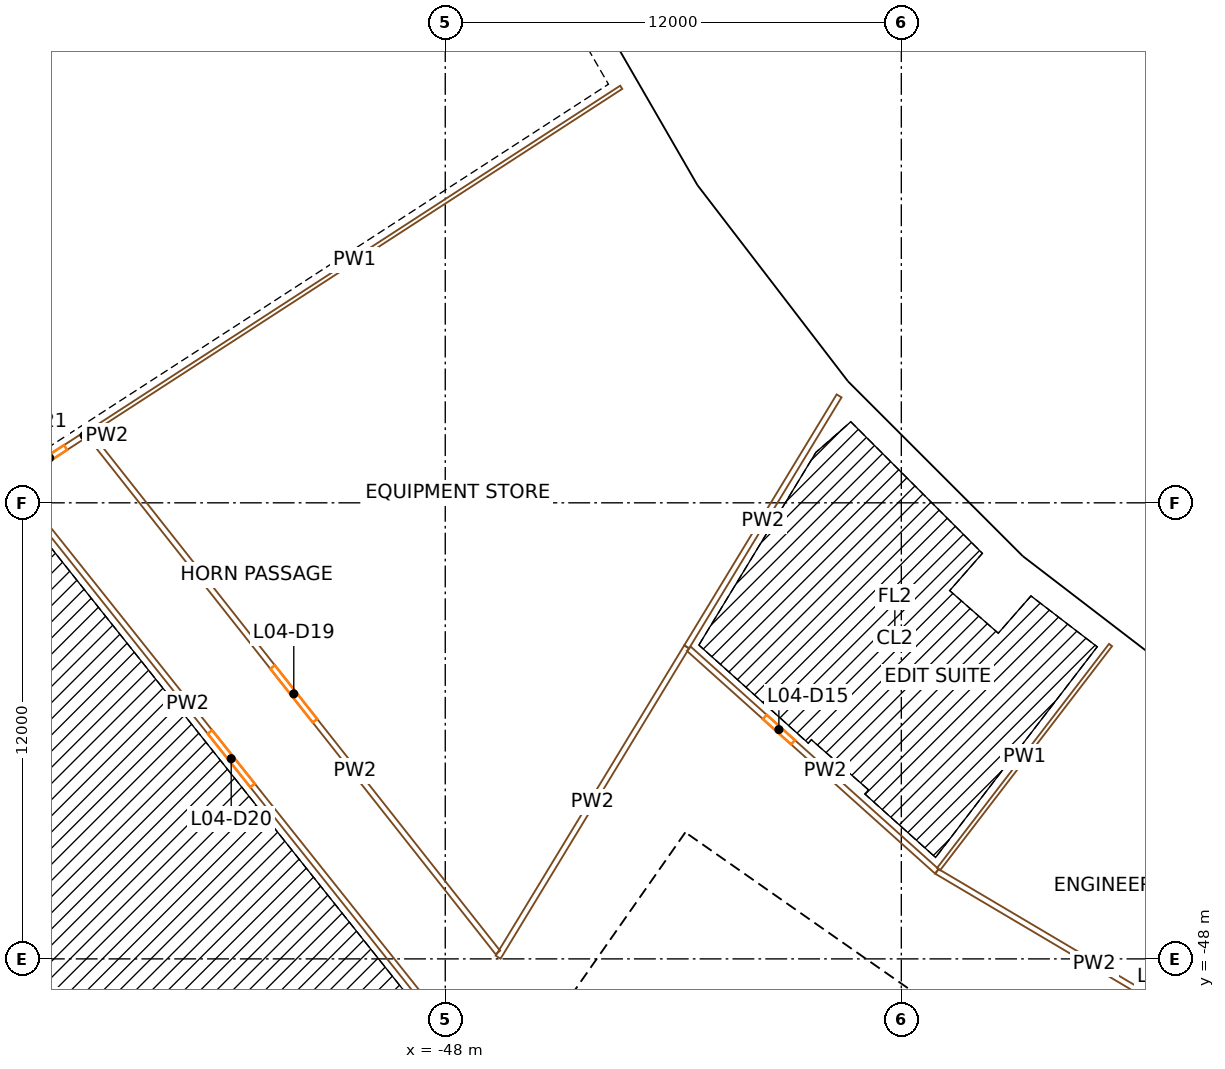
"""IFC4 building model, lengths in metres.
Left out: names, types, materials, properties, quantities, classifications, styles, units other than length and angle.
Written with IfcOpenShell. Run it as: python <this file> out.ifc"""

import sys

from ifc_helpers import new_model, si_unit, direction, frame, frame_2d, origin, origin_2d, place, context, subcontext, project, spatial, rectangle, extrude, element, fill, save


model = new_model("IFC4")
c1 = context("Model", 3, precision=1e-05, world=origin(), true_north=direction((0.0, 1.0)))
c2 = subcontext(c1, "Body", "Model", "MODEL_VIEW")
j1 = project(units=[si_unit("LENGTHUNIT", "METRE"), si_unit("PLANEANGLEUNIT", "RADIAN")], contexts=[c1])
p1 = place(None, origin())
s1 = spatial("IfcSite", under=j1, at=p1, CompositionType="ELEMENT")
p2 = place(p1, origin())
s2 = spatial("IfcBuilding", under=s1, at=p2, CompositionType="ELEMENT")
p3 = place(p2, frame((0.0, 0.0, 31.5)))
s3 = spatial("IfcBuildingStorey", under=s2, at=p3, CompositionType="ELEMENT", Elevation=31.5)
p4 = place(p3, frame((-52.243, -25.763, 0.0), z_axis=(0.0, 0.0, 1.0), x_axis=(0.442288690219, -0.896872741533, 0.0)))
e1 = element("IfcColumn", 1, at=p4, inside=s3, PredefinedType="COLUMN", context=c2, shape_type="SweptSolid", body=[
    extrude(rectangle(XDim=1.4, YDim=1.8, at=origin_2d()), origin(), (0.0, 0.0, 1.0), 4.5),
])
p5 = place(p3, frame((-42.197, -28.195, 0.0), z_axis=(0.0, 0.0, 1.0), x_axis=(0.55557023302, -0.831469612303, 0.0)))
e2 = element("IfcColumn", 2, at=p5, inside=s3, PredefinedType="COLUMN", context=c2, shape_type="SweptSolid", body=[
    extrude(rectangle(XDim=1.1, YDim=1.3, at=origin_2d()), origin(), (0.0, 0.0, 1.0), 4.5),
])
p6 = place(p3, frame((-48.433, -32.362, 0.0), z_axis=(0.0, 0.0, 1.0), x_axis=(0.55557023302, -0.831469612303, 0.0)))
e3 = element("IfcColumn", 3, at=p6, inside=s3, PredefinedType="COLUMN", context=c2, shape_type="SweptSolid", body=[
    extrude(rectangle(XDim=1.4, YDim=1.8, at=origin_2d()), origin(), (0.0, 0.0, 1.0), 4.5),
])
p7 = place(p3, frame((-38.156, -33.462, 0.0), z_axis=(0.0, 0.0, 1.0), x_axis=(0.6593458151, -0.751839807479, 0.0)))
e4 = element("IfcColumn", 4, at=p7, inside=s3, PredefinedType="COLUMN", context=c2, shape_type="SweptSolid", body=[
    extrude(rectangle(XDim=1.1, YDim=1.3, at=origin_2d()), origin(), (0.0, 0.0, 1.0), 4.5),
])
p8 = place(p3, frame((-43.795, -38.407, 0.0), z_axis=(0.0, 0.0, 1.0), x_axis=(0.6593458151, -0.751839807479, 0.0)))
e5 = element("IfcColumn", 5, at=p8, inside=s3, PredefinedType="COLUMN", context=c2, shape_type="SweptSolid", body=[
    extrude(rectangle(XDim=1.4, YDim=1.8, at=origin_2d()), origin(), (0.0, 0.0, 1.0), 4.5),
])
p9 = place(p3, frame((-33.462, -38.156, 0.0), z_axis=(0.0, 0.0, 1.0), x_axis=(0.751839807479, -0.6593458151, 0.0)))
e6 = element("IfcColumn", 6, at=p9, inside=s3, PredefinedType="COLUMN", context=c2, shape_type="SweptSolid", body=[
    extrude(rectangle(XDim=1.1, YDim=1.3, at=origin_2d()), origin(), (0.0, 0.0, 1.0), 4.5),
])
for number, where, z_axis, x_axis in (
    (7, (-38.407, -43.795, 0.0), (0.0, 0.0, 1.0), (0.752, -0.659, 0.0)),
    (8, (-32.362, -48.433, 0.0), (0.0, 0.0, 1.0), (0.831, -0.556, 0.0)),
):
    element("IfcColumn", number, at=place(p3, frame(where, z_axis=z_axis, x_axis=x_axis)), inside=s3, PredefinedType="COLUMN", context=c2, shape_type="SweptSolid", body=[
        extrude(rectangle(XDim=1.4, YDim=1.8, at=origin_2d()), origin(), (0.0, 0.0, 1.0), 4.5),
    ])
p10 = place(p3, frame((-49.779, -57.191, 0.0), z_axis=(0.0, 0.0, 1.0), x_axis=(0.573577477574, 0.819151315216, 0.0)))
e9 = element("IfcWall", 9, at=p10, inside=s3, PredefinedType="SHEAR", context=c2, shape_type="SweptSolid", body=[
    extrude(rectangle(XDim=14.8, YDim=0.9, at=frame_2d((7.4, 0.0))), origin(), (0.0, 0.0, 1.0), 4.1),
])
p11 = place(p10, frame((6.7, 0.0, 0.0)))
e10 = element("IfcOpeningElement", 10, at=p11, cuts=e9, PredefinedType="OPENING", context=c2, shape_type="SweptSolid", body=[
    extrude(rectangle(XDim=1.4, YDim=2.1, at=frame_2d((0.7, 1.05))), frame((0.0, 0.46, 0.0), z_axis=(0.0, -1.0, 0.0), x_axis=(1.0, 0.0, 0.0)), (0.0, 0.0, 1.0), 0.92),
])
p12 = place(p3, frame((-28.854, -54.324, 0.0), z_axis=(0.0, 0.0, 1.0), x_axis=(-0.819145767589, 0.573585400304, 0.0)))
e11 = element("IfcWall", 11, at=p12, inside=s3, PredefinedType="SHEAR", context=c2, shape_type="SweptSolid", body=[
    extrude(rectangle(XDim=15.045, YDim=0.9, at=frame_2d((7.523, 0.0))), origin(), (0.0, 0.0, 1.0), 4.1),
])
p13 = place(p12, frame((1.05, 0.0, 0.0)))
e12 = element("IfcOpeningElement", 12, at=p13, cuts=e11, PredefinedType="OPENING", context=c2, shape_type="SweptSolid", body=[
    extrude(rectangle(XDim=0.9, YDim=2.1, at=frame_2d((0.45, 1.05))), frame((0.0, 0.46, 0.0), z_axis=(0.0, -1.0, 0.0), x_axis=(1.0, 0.0, 0.0)), (0.0, 0.0, 1.0), 0.92),
])
p14 = place(p12, frame((3.775, 0.0, 0.0)))
e13 = element("IfcOpeningElement", 13, at=p14, cuts=e11, PredefinedType="OPENING", context=c2, shape_type="SweptSolid", body=[
    extrude(rectangle(XDim=1.0, YDim=2.1, at=frame_2d((0.5, 1.05))), frame((0.0, 0.46, 0.0), z_axis=(0.0, -1.0, 0.0), x_axis=(1.0, 0.0, 0.0)), (0.0, 0.0, 1.0), 0.92),
])
p15 = place(p12, frame((6.275, 0.0, 0.0)))
e14 = element("IfcOpeningElement", 14, at=p15, cuts=e11, PredefinedType="OPENING", context=c2, shape_type="SweptSolid", body=[
    extrude(rectangle(XDim=1.0, YDim=2.1, at=frame_2d((0.5, 1.05))), frame((0.0, 0.46, 0.0), z_axis=(0.0, -1.0, 0.0), x_axis=(1.0, 0.0, 0.0)), (0.0, 0.0, 1.0), 0.92),
])
p16 = place(p12, frame((13.495, 0.0, 0.0)))
e15 = element("IfcOpeningElement", 15, at=p16, cuts=e11, PredefinedType="OPENING", context=c2, shape_type="SweptSolid", body=[
    extrude(rectangle(XDim=1.1, YDim=2.1, at=frame_2d((0.55, 1.05))), frame((0.0, 0.46, 0.0), z_axis=(0.0, -1.0, 0.0), x_axis=(1.0, 0.0, 0.0)), (0.0, 0.0, 1.0), 0.92),
])
p17 = place(p3, frame((-41.583, -27.714, 0.0), z_axis=(0.0, 0.0, 1.0), x_axis=(-0.50000447882, 0.866022817921, 0.0)))
e16 = element("IfcWall", 16, at=p17, inside=s3, PredefinedType="SOLIDWALL", context=c2, shape_type="SweptSolid", body=[
    extrude(rectangle(XDim=6.419, YDim=0.45, at=frame_2d((3.21, 0.0))), origin(), (0.0, 0.0, 1.0), 3.2),
])
p18 = place(p17, frame((3.66, 0.0, 0.9)))
e17 = element("IfcOpeningElement", 17, at=p18, cuts=e16, PredefinedType="OPENING", context=c2, shape_type="SweptSolid", body=[
    extrude(rectangle(XDim=1.2, YDim=2.15, at=frame_2d((0.6, 1.075))), frame((0.0, 0.235, 0.0), z_axis=(0.0, -1.0, 0.0), x_axis=(1.0, 0.0, 0.0)), (0.0, 0.0, 1.0), 0.47),
])
p19 = place(p17, frame((1.56, 0.0, 0.9)))
e18 = element("IfcOpeningElement", 18, at=p19, cuts=e16, PredefinedType="OPENING", context=c2, shape_type="SweptSolid", body=[
    extrude(rectangle(XDim=1.2, YDim=2.15, at=frame_2d((0.6, 1.075))), frame((0.0, 0.235, 0.0), z_axis=(0.0, -1.0, 0.0), x_axis=(1.0, 0.0, 0.0)), (0.0, 0.0, 1.0), 0.47),
])
p20 = place(p3, frame((-37.555, -32.975, 0.0), z_axis=(0.0, 0.0, 1.0), x_axis=(-0.608780327927, 0.793338838284, 0.0)))
e19 = element("IfcWall", 19, at=p20, inside=s3, PredefinedType="SOLIDWALL", context=c2, shape_type="SweptSolid", body=[
    extrude(rectangle(XDim=6.597, YDim=0.45, at=frame_2d((3.298, 0.0))), origin(), (0.0, 0.0, 1.0), 3.2),
])
p21 = place(p20, frame((3.749, 0.0, 0.9)))
e20 = element("IfcOpeningElement", 20, at=p21, cuts=e19, PredefinedType="OPENING", context=c2, shape_type="SweptSolid", body=[
    extrude(rectangle(XDim=1.2, YDim=2.15, at=frame_2d((0.6, 1.075))), frame((0.0, 0.235, 0.0), z_axis=(0.0, -1.0, 0.0), x_axis=(1.0, 0.0, 0.0)), (0.0, 0.0, 1.0), 0.47),
])
p22 = place(p20, frame((1.648, 0.0, 0.9)))
e21 = element("IfcOpeningElement", 21, at=p22, cuts=e19, PredefinedType="OPENING", context=c2, shape_type="SweptSolid", body=[
    extrude(rectangle(XDim=1.2, YDim=2.15, at=frame_2d((0.6, 1.075))), frame((0.0, 0.235, 0.0), z_axis=(0.0, -1.0, 0.0), x_axis=(1.0, 0.0, 0.0)), (0.0, 0.0, 1.0), 0.47),
])
p23 = place(p3, frame((-32.993, -37.532, 0.0), z_axis=(0.0, 0.0, 1.0), x_axis=(-0.707106781187, 0.707106781187, 0.0)))
e22 = element("IfcWall", 22, at=p23, inside=s3, PredefinedType="SOLIDWALL", context=c2, shape_type="SweptSolid", body=[
    extrude(rectangle(XDim=6.419, YDim=0.45, at=frame_2d((3.209, 0.0))), origin(), (0.0, 0.0, 1.0), 3.2),
])
p24 = place(p23, frame((3.66, 0.0, 0.9)))
e23 = element("IfcOpeningElement", 23, at=p24, cuts=e22, PredefinedType="OPENING", context=c2, shape_type="SweptSolid", body=[
    extrude(rectangle(XDim=1.2, YDim=2.15, at=frame_2d((0.6, 1.075))), frame((0.0, 0.235, 0.0), z_axis=(0.0, -1.0, 0.0), x_axis=(1.0, 0.0, 0.0)), (0.0, 0.0, 1.0), 0.47),
])
p25 = place(p23, frame((1.56, 0.0, 0.9)))
e24 = element("IfcOpeningElement", 24, at=p25, cuts=e22, PredefinedType="OPENING", context=c2, shape_type="SweptSolid", body=[
    extrude(rectangle(XDim=1.2, YDim=2.15, at=frame_2d((0.6, 1.075))), frame((0.0, 0.235, 0.0), z_axis=(0.0, -1.0, 0.0), x_axis=(1.0, 0.0, 0.0)), (0.0, 0.0, 1.0), 0.47),
])
p26 = place(p3, frame((-27.741, -41.571, 0.0), z_axis=(0.0, 0.0, 1.0), x_axis=(-0.793338838284, 0.608780327927, 0.0)))
e25 = element("IfcWall", 25, at=p26, inside=s3, PredefinedType="SOLIDWALL", context=c2, shape_type="SweptSolid", body=[
    extrude(rectangle(XDim=6.597, YDim=0.45, at=frame_2d((3.298, 0.0))), origin(), (0.0, 0.0, 1.0), 3.2),
])
p27 = place(p26, frame((3.749, 0.0, 0.9)))
e26 = element("IfcOpeningElement", 26, at=p27, cuts=e25, PredefinedType="OPENING", context=c2, shape_type="SweptSolid", body=[
    extrude(rectangle(XDim=1.2, YDim=2.15, at=frame_2d((0.6, 1.075))), frame((0.0, 0.235, 0.0), z_axis=(0.0, -1.0, 0.0), x_axis=(1.0, 0.0, 0.0)), (0.0, 0.0, 1.0), 0.47),
])
p28 = place(p26, frame((1.648, 0.0, 0.9)))
e27 = element("IfcOpeningElement", 27, at=p28, cuts=e25, PredefinedType="OPENING", context=c2, shape_type="SweptSolid", body=[
    extrude(rectangle(XDim=1.2, YDim=2.15, at=frame_2d((0.6, 1.075))), frame((0.0, 0.235, 0.0), z_axis=(0.0, -1.0, 0.0), x_axis=(1.0, 0.0, 0.0)), (0.0, 0.0, 1.0), 0.47),
])
p29 = place(p3, frame((-59.418, -35.47, 0.0), z_axis=(0.0, 0.0, 1.0), x_axis=(0.839081673018, 0.544005465051, 0.0)))
e28 = element("IfcWall", 28, at=p29, inside=s3, PredefinedType="PARTITIONING", context=c2, shape_type="SweptSolid", body=[
    extrude(rectangle(XDim=2.402, YDim=0.15, at=frame_2d((1.201, 0.0))), origin(), (0.0, 0.0, 1.0), 3.1),
])
p30 = place(p29, frame((0.701, 0.0, 0.0)))
e29 = element("IfcOpeningElement", 29, at=p30, cuts=e28, PredefinedType="OPENING", context=c2, shape_type="SweptSolid", body=[
    extrude(rectangle(XDim=1.0, YDim=2.1, at=frame_2d((0.5, 1.05))), frame((0.0, 0.085, 0.0), z_axis=(0.0, -1.0, 0.0), x_axis=(1.0, 0.0, 0.0)), (0.0, 0.0, 1.0), 0.17),
])
p31 = place(p3, frame((-57.403, -34.164, 0.0), z_axis=(0.0, 0.0, 1.0), x_axis=(0.83909708633, 0.543981690604, 0.0)))
e30 = element("IfcWall", 30, at=p31, inside=s3, PredefinedType="PARTITIONING", context=c2, shape_type="SweptSolid", body=[
    extrude(rectangle(XDim=16.723, YDim=0.1, at=frame_2d((8.362, 0.0))), origin(), (0.0, 0.0, 1.0), 3.1),
])
p32 = place(p3, frame((-47.893, -49.935, 0.0), z_axis=(0.0, 0.0, 1.0), x_axis=(-0.623151769875, 0.782100934472, 0.0)))
e31 = element("IfcWall", 31, at=p32, inside=s3, PredefinedType="PARTITIONING", context=c2, shape_type="SweptSolid", body=[
    extrude(rectangle(XDim=18.419, YDim=0.15, at=frame_2d((9.21, 0.0))), origin(), (0.0, 0.0, 1.0), 3.1),
])
p33 = place(p32, frame((8.31, 0.0, 0.0)))
e32 = element("IfcOpeningElement", 32, at=p33, cuts=e31, PredefinedType="OPENING", context=c2, shape_type="SweptSolid", body=[
    extrude(rectangle(XDim=1.8, YDim=2.1, at=frame_2d((0.9, 1.05))), frame((0.0, 0.085, 0.0), z_axis=(0.0, -1.0, 0.0), x_axis=(1.0, 0.0, 0.0)), (0.0, 0.0, 1.0), 0.17),
])
p34 = place(p3, frame((-57.356, -34.223, 0.0), z_axis=(0.0, 0.0, 1.0), x_axis=(0.619510500346, -0.784988369316, 0.0)))
e33 = element("IfcWall", 33, at=p34, inside=s3, PredefinedType="PARTITIONING", context=c2, shape_type="SweptSolid", body=[
    extrude(rectangle(XDim=17.337, YDim=0.15, at=frame_2d((8.668, 0.0))), origin(), (0.0, 0.0, 1.0), 3.1),
])
p35 = place(p34, frame((7.769, 0.0, 0.0)))
e34 = element("IfcOpeningElement", 34, at=p35, cuts=e33, PredefinedType="OPENING", context=c2, shape_type="SweptSolid", body=[
    extrude(rectangle(XDim=1.8, YDim=2.1, at=frame_2d((0.9, 1.05))), frame((0.0, 0.085, 0.0), z_axis=(0.0, -1.0, 0.0), x_axis=(1.0, 0.0, 0.0)), (0.0, 0.0, 1.0), 0.17),
])
p36 = place(p3, frame((-41.648, -39.789, 0.0), z_axis=(0.0, 0.0, 1.0), x_axis=(-0.519144162426, -0.854686690325, 0.0)))
e35 = element("IfcWall", 35, at=p36, inside=s3, PredefinedType="PARTITIONING", context=c2, shape_type="SweptSolid", body=[
    extrude(rectangle(XDim=9.554, YDim=0.15, at=frame_2d((4.777, 0.0))), origin(), (0.0, 0.0, 1.0), 3.1),
])
p37 = place(p3, frame((-41.592, -39.839, 0.0), z_axis=(0.0, 0.0, 1.0), x_axis=(0.744252572607, -0.667898276812, 0.0)))
e36 = element("IfcWall", 36, at=p37, inside=s3, PredefinedType="PARTITIONING", context=c2, shape_type="SweptSolid", body=[
    extrude(rectangle(XDim=8.771, YDim=0.15, at=frame_2d((4.385, 0.0))), origin(), (0.0, 0.0, 1.0), 3.1),
])
p38 = place(p37, frame((2.685, 0.0, 0.0)))
e37 = element("IfcOpeningElement", 37, at=p38, cuts=e36, PredefinedType="OPENING", context=c2, shape_type="SweptSolid", body=[
    extrude(rectangle(XDim=1.0, YDim=2.1, at=frame_2d((0.5, 1.05))), frame((0.0, 0.085, 0.0), z_axis=(0.0, -1.0, 0.0), x_axis=(1.0, 0.0, 0.0)), (0.0, 0.0, 1.0), 0.17),
])
p39 = place(p3, frame((-37.638, -33.187, 0.0), z_axis=(0.0, 0.0, 1.0), x_axis=(-0.519163683086, -0.854674833, 0.0)))
e38 = element("IfcWall", 38, at=p39, inside=s3, PredefinedType="PARTITIONING", context=c2, shape_type="SweptSolid", body=[
    extrude(rectangle(XDim=7.725, YDim=0.15, at=frame_2d((3.862, 0.0))), origin(), (0.0, 0.0, 1.0), 3.1),
])
p40 = place(p3, frame((-35.065, -45.697, 0.0), z_axis=(0.0, 0.0, 1.0), x_axis=(0.860638818745, -0.509215891022, 0.0)))
e39 = element("IfcWall", 39, at=p40, inside=s3, PredefinedType="PARTITIONING", context=c2, shape_type="SweptSolid", body=[
    extrude(rectangle(XDim=13.741, YDim=0.15, at=frame_2d((6.871, 0.0))), origin(), (0.0, 0.0, 1.0), 3.1),
])
p41 = place(p40, frame((6.37, 0.0, 0.0)))
e40 = element("IfcOpeningElement", 40, at=p41, cuts=e39, PredefinedType="OPENING", context=c2, shape_type="SweptSolid", body=[
    extrude(rectangle(XDim=1.0, YDim=2.1, at=frame_2d((0.5, 1.05))), frame((0.0, 0.085, 0.0), z_axis=(0.0, -1.0, 0.0), x_axis=(1.0, 0.0, 0.0)), (0.0, 0.0, 1.0), 0.17),
])
p42 = place(p3, frame((-30.495, -39.742, 0.0), z_axis=(0.0, 0.0, 1.0), x_axis=(-0.60877839598, -0.793340320788, 0.0)))
e41 = element("IfcWall", 41, at=p42, inside=s3, PredefinedType="PARTITIONING", context=c2, shape_type="SweptSolid", body=[
    extrude(rectangle(XDim=7.432, YDim=0.1, at=frame_2d((3.716, 0.0))), origin(), (0.0, 0.0, 1.0), 3.1),
])
p43 = place(p16, origin())
e42 = element("IfcDoor", 42, at=p43, inside=s3, OperationType="SINGLE_SWING_RIGHT", PredefinedType="DOOR", context=c2, shape_type="SweptSolid", body=[
    extrude(rectangle(XDim=1.1, YDim=2.1, at=frame_2d((0.55, 1.05))), frame((0.0, 0.025, 0.0), z_axis=(0.0, -1.0, 0.0), x_axis=(1.0, 0.0, 0.0)), (0.0, 0.0, 1.0), 0.05),
])
fill(e15, e42)
p44 = place(p18, origin())
e43 = element("IfcWindow", 43, at=p44, inside=s3, PartitioningType="SINGLE_PANEL", PredefinedType="WINDOW", context=c2, shape_type="SweptSolid", body=[
    extrude(rectangle(XDim=1.2, YDim=2.15, at=frame_2d((0.6, 1.075))), frame((0.0, 0.03, 0.0), z_axis=(0.0, -1.0, 0.0), x_axis=(1.0, 0.0, 0.0)), (0.0, 0.0, 1.0), 0.06),
])
fill(e17, e43)
p45 = place(p19, origin())
e44 = element("IfcWindow", 44, at=p45, inside=s3, PartitioningType="SINGLE_PANEL", PredefinedType="WINDOW", context=c2, shape_type="SweptSolid", body=[
    extrude(rectangle(XDim=1.2, YDim=2.15, at=frame_2d((0.6, 1.075))), frame((0.0, 0.03, 0.0), z_axis=(0.0, -1.0, 0.0), x_axis=(1.0, 0.0, 0.0)), (0.0, 0.0, 1.0), 0.06),
])
fill(e18, e44)
p46 = place(p21, origin())
e45 = element("IfcWindow", 45, at=p46, inside=s3, PartitioningType="SINGLE_PANEL", PredefinedType="WINDOW", context=c2, shape_type="SweptSolid", body=[
    extrude(rectangle(XDim=1.2, YDim=2.15, at=frame_2d((0.6, 1.075))), frame((0.0, 0.03, 0.0), z_axis=(0.0, -1.0, 0.0), x_axis=(1.0, 0.0, 0.0)), (0.0, 0.0, 1.0), 0.06),
])
fill(e20, e45)
p47 = place(p22, origin())
e46 = element("IfcWindow", 46, at=p47, inside=s3, PartitioningType="SINGLE_PANEL", PredefinedType="WINDOW", context=c2, shape_type="SweptSolid", body=[
    extrude(rectangle(XDim=1.2, YDim=2.15, at=frame_2d((0.6, 1.075))), frame((0.0, 0.03, 0.0), z_axis=(0.0, -1.0, 0.0), x_axis=(1.0, 0.0, 0.0)), (0.0, 0.0, 1.0), 0.06),
])
fill(e21, e46)
p48 = place(p24, origin())
e47 = element("IfcWindow", 47, at=p48, inside=s3, PartitioningType="SINGLE_PANEL", PredefinedType="WINDOW", context=c2, shape_type="SweptSolid", body=[
    extrude(rectangle(XDim=1.2, YDim=2.15, at=frame_2d((0.6, 1.075))), frame((0.0, 0.03, 0.0), z_axis=(0.0, -1.0, 0.0), x_axis=(1.0, 0.0, 0.0)), (0.0, 0.0, 1.0), 0.06),
])
fill(e23, e47)
p49 = place(p25, origin())
e48 = element("IfcWindow", 48, at=p49, inside=s3, PartitioningType="SINGLE_PANEL", PredefinedType="WINDOW", context=c2, shape_type="SweptSolid", body=[
    extrude(rectangle(XDim=1.2, YDim=2.15, at=frame_2d((0.6, 1.075))), frame((0.0, 0.03, 0.0), z_axis=(0.0, -1.0, 0.0), x_axis=(1.0, 0.0, 0.0)), (0.0, 0.0, 1.0), 0.06),
])
fill(e24, e48)
p50 = place(p27, origin())
e49 = element("IfcWindow", 49, at=p50, inside=s3, PartitioningType="SINGLE_PANEL", PredefinedType="WINDOW", context=c2, shape_type="SweptSolid", body=[
    extrude(rectangle(XDim=1.2, YDim=2.15, at=frame_2d((0.6, 1.075))), frame((0.0, 0.03, 0.0), z_axis=(0.0, -1.0, 0.0), x_axis=(1.0, 0.0, 0.0)), (0.0, 0.0, 1.0), 0.06),
])
fill(e26, e49)
p51 = place(p28, origin())
e50 = element("IfcWindow", 50, at=p51, inside=s3, PartitioningType="SINGLE_PANEL", PredefinedType="WINDOW", context=c2, shape_type="SweptSolid", body=[
    extrude(rectangle(XDim=1.2, YDim=2.15, at=frame_2d((0.6, 1.075))), frame((0.0, 0.03, 0.0), z_axis=(0.0, -1.0, 0.0), x_axis=(1.0, 0.0, 0.0)), (0.0, 0.0, 1.0), 0.06),
])
fill(e27, e50)
p52 = place(p38, origin())
e51 = element("IfcDoor", 51, at=p52, inside=s3, OperationType="SINGLE_SWING_LEFT", PredefinedType="DOOR", context=c2, shape_type="SweptSolid", body=[
    extrude(rectangle(XDim=1.0, YDim=2.1, at=frame_2d((0.5, 1.05))), frame((0.0, 0.025, 0.0), z_axis=(0.0, -1.0, 0.0), x_axis=(1.0, 0.0, 0.0)), (0.0, 0.0, 1.0), 0.05),
])
fill(e37, e51)
p53 = place(p35, origin())
e52 = element("IfcDoor", 52, at=p53, inside=s3, OperationType="DOUBLE_DOOR_SINGLE_SWING", PredefinedType="DOOR", context=c2, shape_type="SweptSolid", body=[
    extrude(rectangle(XDim=1.8, YDim=2.1, at=frame_2d((0.9, 1.05))), frame((0.0, 0.025, 0.0), z_axis=(0.0, -1.0, 0.0), x_axis=(1.0, 0.0, 0.0)), (0.0, 0.0, 1.0), 0.05),
])
fill(e34, e52)
p54 = place(p33, origin())
e53 = element("IfcDoor", 53, at=p54, inside=s3, OperationType="DOUBLE_DOOR_SINGLE_SWING", PredefinedType="DOOR", context=c2, shape_type="SweptSolid", body=[
    extrude(rectangle(XDim=1.8, YDim=2.1, at=frame_2d((0.9, 1.05))), frame((0.0, 0.025, 0.0), z_axis=(0.0, -1.0, 0.0), x_axis=(1.0, 0.0, 0.0)), (0.0, 0.0, 1.0), 0.05),
])
fill(e32, e53)
p55 = place(p30, origin())
e54 = element("IfcDoor", 54, at=p55, inside=s3, OperationType="SINGLE_SWING_RIGHT", PredefinedType="DOOR", context=c2, shape_type="SweptSolid", body=[
    extrude(rectangle(XDim=1.0, YDim=2.1, at=frame_2d((0.5, 1.05))), frame((0.0, 0.025, 0.0), z_axis=(0.0, -1.0, 0.0), x_axis=(1.0, 0.0, 0.0)), (0.0, 0.0, 1.0), 0.05),
])
fill(e29, e54)
save(model, sys.argv[1])
